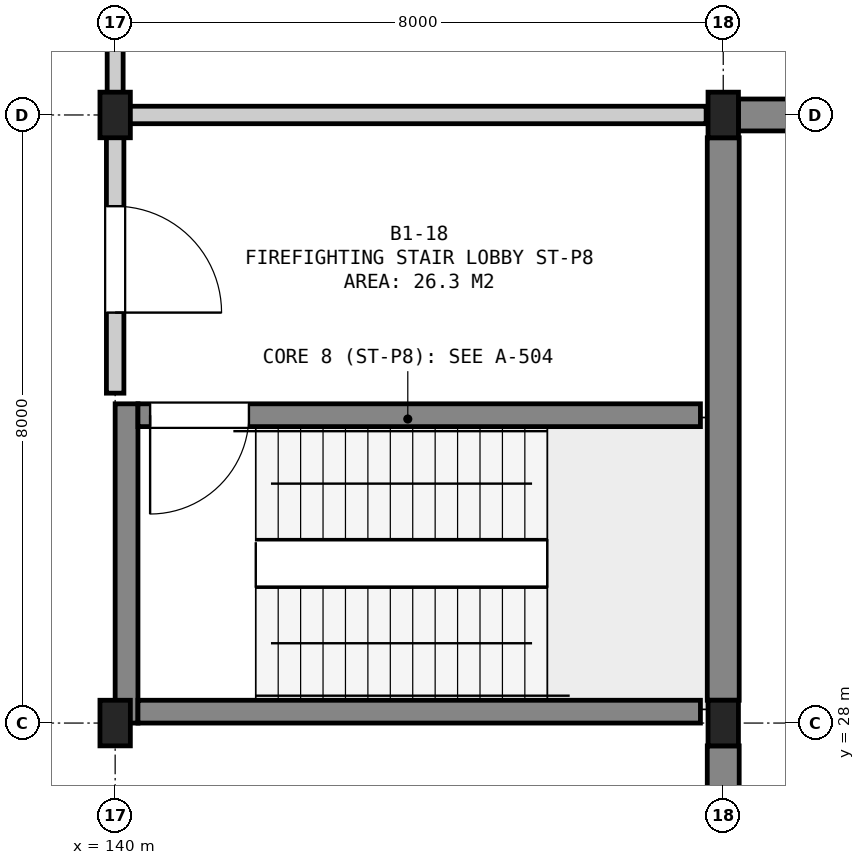
"""IFC4 building model, lengths in metres.
Left out: names, types, materials, properties, quantities, classifications, styles, units other than length and angle.
Written with IfcOpenShell. Run it as: python <this file> out.ifc"""

import sys

from ifc_helpers import new_model, si_unit, direction, frame, frame_2d, origin, origin_2d, place, context, subcontext, project, spatial, rectangle, extrude, element, fill, save


model = new_model("IFC4")
c1 = context("Model", 3, precision=1e-05, world=origin(), true_north=direction((0.0, 1.0)))
c2 = subcontext(c1, "Body", "Model", "MODEL_VIEW")
j1 = project(units=[si_unit("LENGTHUNIT", "METRE"), si_unit("PLANEANGLEUNIT", "RADIAN")], contexts=[c1])
p1 = place(None, origin())
s1 = spatial("IfcSite", under=j1, at=p1, CompositionType="ELEMENT")
p2 = place(p1, origin())
s2 = spatial("IfcBuilding", under=s1, at=p2, CompositionType="ELEMENT")
p3 = place(p2, frame((0.0, 0.0, -4.5)))
s3 = spatial("IfcBuildingStorey", under=s2, at=p3, CompositionType="ELEMENT", Elevation=-4.5)
for number, where, z_axis, x_axis in (
    (1, (140.0, 28.0, 0.0), (0.0, 0.0, 1.0), (1.0, 0.0, 0.0)),
    (2, (140.0, 36.0, 0.0), (0.0, 0.0, 1.0), (1.0, 0.0, 0.0)),
    (3, (148.0, 28.0, 0.0), (0.0, 0.0, 1.0), (1.0, 0.0, 0.0)),
    (4, (148.0, 36.0, 0.0), (0.0, 0.0, 1.0), (1.0, 0.0, 0.0)),
):
    element("IfcColumn", number, at=place(p3, frame(where, z_axis=z_axis, x_axis=x_axis)), inside=s3, PredefinedType="COLUMN", context=c2, shape_type="SweptSolid", body=[
        extrude(rectangle(XDim=0.4, YDim=0.6, at=origin_2d()), origin(), (0.0, 0.0, 1.0), 4.5),
    ])
p4 = place(p3, frame((148.0, 13.175, 0.0), z_axis=(0.0, 0.0, 1.0), x_axis=(0.0, 1.0, 0.0)))
e5 = element("IfcWall", 5, at=p4, inside=s3, PredefinedType="SOLIDWALL", context=c2, shape_type="SweptSolid", body=[
    extrude(rectangle(XDim=14.525, YDim=0.42, at=frame_2d((7.262, 0.0))), origin(), (0.0, 0.0, 1.0), 4.08),
])
p5 = place(p3, frame((148.0, 28.3, 0.0), z_axis=(0.0, 0.0, 1.0), x_axis=(0.0, 1.0, 0.0)))
e6 = element("IfcWall", 6, at=p5, inside=s3, PredefinedType="SOLIDWALL", context=c2, shape_type="SweptSolid", body=[
    extrude(rectangle(XDim=7.4, YDim=0.42, at=frame_2d((3.7, 0.0))), origin(), (0.0, 0.0, 1.0), 4.08),
])
p6 = place(p3, frame((148.2, 36.0, 0.0), z_axis=(0.0, 0.0, 1.0), x_axis=(1.0, 0.0, 0.0)))
e7 = element("IfcWall", 7, at=p6, inside=s3, PredefinedType="SOLIDWALL", context=c2, shape_type="SweptSolid", body=[
    extrude(rectangle(XDim=12.975, YDim=0.42, at=frame_2d((6.488, 0.0))), origin(), (0.0, 0.0, 1.0), 4.08),
])
p7 = place(p3, frame((140.15, 28.0, 0.0), z_axis=(0.0, 0.0, 1.0), x_axis=(0.0, 1.0, 0.0)))
e8 = element("IfcWall", 8, at=p7, inside=s3, PredefinedType="SHEAR", context=c2, shape_type="SweptSolid", body=[
    extrude(rectangle(XDim=4.2, YDim=0.3, at=frame_2d((2.1, 0.0))), origin(), (0.0, 0.0, 1.0), 4.08),
])
p8 = place(p3, frame((140.3, 28.15, 0.0), z_axis=(0.0, 0.0, 1.0), x_axis=(1.0, 0.0, 0.0)))
e9 = element("IfcWall", 9, at=p8, inside=s3, PredefinedType="SHEAR", context=c2, shape_type="SweptSolid", body=[
    extrude(rectangle(XDim=7.4, YDim=0.3, at=frame_2d((3.7, 0.0))), origin(), (0.0, 0.0, 1.0), 4.08),
])
p9 = place(p3, frame((140.3, 32.05, 0.0), z_axis=(0.0, 0.0, 1.0), x_axis=(1.0, 0.0, 0.0)))
e10 = element("IfcWall", 10, at=p9, inside=s3, PredefinedType="SHEAR", context=c2, shape_type="SweptSolid", body=[
    extrude(rectangle(XDim=7.4, YDim=0.3, at=frame_2d((3.7, 0.0))), origin(), (0.0, 0.0, 1.0), 4.08),
])
p10 = place(p9, frame((0.16, 0.0, 0.0)))
e11 = element("IfcOpeningElement", 11, at=p10, cuts=e10, PredefinedType="OPENING", context=c2, shape_type="SweptSolid", body=[
    extrude(rectangle(XDim=1.3, YDim=2.18, at=frame_2d((0.65, 1.09))), frame((0.0, 0.162, 0.0), z_axis=(0.0, -1.0, 0.0), x_axis=(1.0, 0.0, 0.0)), (0.0, 0.0, 1.0), 0.324),
])
p11 = place(p3, frame((140.14, 36.0, 0.0), z_axis=(0.0, 0.0, 1.0), x_axis=(1.0, 0.0, 0.0)))
e12 = element("IfcWall", 12, at=p11, inside=s3, PredefinedType="SOLIDWALL", context=c2, shape_type="SweptSolid", body=[
    extrude(rectangle(XDim=7.635, YDim=0.23, at=frame_2d((3.817, 0.0))), origin(), (0.0, 0.0, 1.0), 3.325),
])
p12 = place(p3, frame((140.0, 32.34, 0.0), z_axis=(0.0, 0.0, 1.0), x_axis=(0.0, 1.0, 0.0)))
e13 = element("IfcWall", 13, at=p12, inside=s3, PredefinedType="SOLIDWALL", context=c2, shape_type="SweptSolid", body=[
    extrude(rectangle(XDim=3.52, YDim=0.23, at=frame_2d((1.76, 0.0))), origin(), (0.0, 0.0, 1.0), 3.575),
])
p13 = place(p12, frame((1.06, 0.0, 0.0)))
e14 = element("IfcOpeningElement", 14, at=p13, cuts=e13, PredefinedType="OPENING", context=c2, shape_type="SweptSolid", body=[
    extrude(rectangle(XDim=1.4, YDim=2.2, at=frame_2d((0.7, 1.1))), frame((0.0, 0.127, 0.0), z_axis=(0.0, -1.0, 0.0), x_axis=(1.0, 0.0, 0.0)), (0.0, 0.0, 1.0), 0.254),
])
p14 = place(p3, frame((140.0, 36.14, 0.0), z_axis=(0.0, 0.0, 1.0), x_axis=(0.0, 1.0, 0.0)))
e15 = element("IfcWall", 15, at=p14, inside=s3, PredefinedType="SOLIDWALL", context=c2, shape_type="SweptSolid", body=[
    extrude(rectangle(XDim=29.32, YDim=0.21, at=frame_2d((14.66, 0.0))), origin(), (0.0, 0.0, 1.0), 3.225),
])
p15 = place(p14, frame((10.76, 0.0, 0.0)))
e16 = element("IfcOpeningElement", 16, at=p15, cuts=e15, PredefinedType="OPENING", context=c2, shape_type="SweptSolid", body=[
    extrude(rectangle(XDim=1.4, YDim=2.2, at=frame_2d((0.7, 1.1))), frame((0.0, 0.117, 0.0), z_axis=(0.0, -1.0, 0.0), x_axis=(1.0, 0.0, 0.0)), (0.0, 0.0, 1.0), 0.234),
])
p16 = place(p10, frame((1.3, 0.0, 0.0), z_axis=(0.0, 0.0, 1.0), x_axis=(-1.0, 0.0, 0.0)))
e17 = element("IfcDoor", 17, at=p16, inside=s3, OperationType="SINGLE_SWING_RIGHT", PredefinedType="DOOR", context=c2, shape_type="SweptSolid", body=[
    extrude(rectangle(XDim=1.3, YDim=2.18, at=frame_2d((0.65, 1.09))), frame((0.0, 0.025, 0.0), z_axis=(0.0, -1.0, 0.0), x_axis=(1.0, 0.0, 0.0)), (0.0, 0.0, 1.0), 0.05),
])
fill(e11, e17)
p17 = place(p13, frame((1.4, 0.0, 0.0), z_axis=(0.0, 0.0, 1.0), x_axis=(-1.0, 0.0, 0.0)))
e18 = element("IfcDoor", 18, at=p17, inside=s3, OperationType="SINGLE_SWING_RIGHT", PredefinedType="DOOR", context=c2, shape_type="SweptSolid", body=[
    extrude(rectangle(XDim=1.4, YDim=2.2, at=frame_2d((0.7, 1.1))), frame((0.0, 0.025, 0.0), z_axis=(0.0, -1.0, 0.0), x_axis=(1.0, 0.0, 0.0)), (0.0, 0.0, 1.0), 0.05),
])
fill(e14, e18)
save(model, sys.argv[1])
